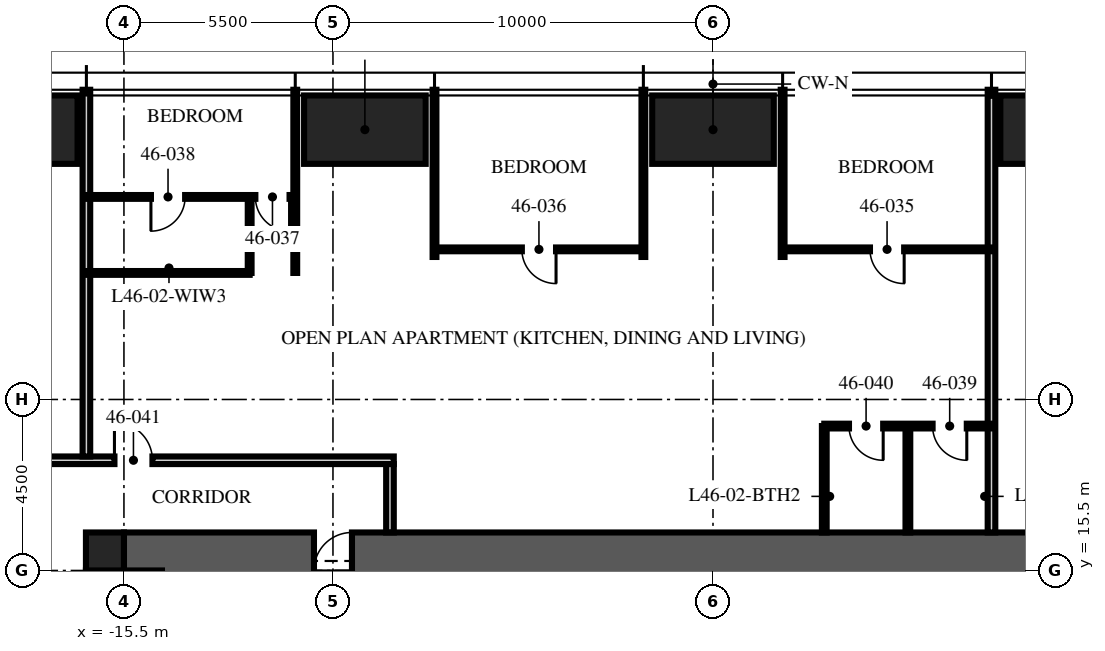
"""IFC4 building model, lengths in metres.
Left out: names, types, materials, properties, quantities, classifications, styles, units other than length and angle.
Written with IfcOpenShell. Run it as: python <this file> out.ifc"""

import sys

from ifc_helpers import new_model, si_unit, direction, frame, frame_2d, origin, origin_2d, place, context, subcontext, project, spatial, rectangle, hollow_rectangle, extrude, element, fill, save


model = new_model("IFC4")
c1 = context("Model", 3, precision=1e-05, world=origin(), true_north=direction((0.0, 1.0)))
c2 = subcontext(c1, "Body", "Model", "MODEL_VIEW")
j1 = project(units=[si_unit("LENGTHUNIT", "METRE"), si_unit("PLANEANGLEUNIT", "RADIAN")], contexts=[c1])
p1 = place(None, origin())
s1 = spatial("IfcSite", under=j1, at=p1, CompositionType="ELEMENT")
p2 = place(p1, origin())
s2 = spatial("IfcBuilding", under=s1, at=p2, CompositionType="ELEMENT")
p3 = place(p2, frame((0.0, 0.0, 182.25)))
s3 = spatial("IfcBuildingStorey", under=s2, at=p3, CompositionType="ELEMENT", Elevation=182.25)
p4 = place(p3, frame((-15.5, 15.5, -0.25), z_axis=(0.0, 0.0, 1.0), x_axis=(1.0, 0.0, 0.0)))
e1 = element("IfcWall", 1, at=p4, inside=s3, PredefinedType="SHEAR", context=c2, shape_type="SweptSolid", body=[
    extrude(rectangle(XDim=31.0, YDim=2.0, at=frame_2d((15.5, 0.0))), origin(), (0.0, 0.0, 1.0), 3.7),
])
p5 = place(p4, frame((5.0, 0.0, 0.25)))
e2 = element("IfcOpeningElement", 2, at=p5, cuts=e1, PredefinedType="OPENING", context=c2, shape_type="SweptSolid", body=[
    extrude(rectangle(XDim=1.0, YDim=2.1, at=frame_2d((0.5, 1.05))), frame((0.0, 1.01, 0.0), z_axis=(0.0, -1.0, 0.0), x_axis=(1.0, 0.0, 0.0)), (0.0, 0.0, 1.0), 2.02),
])
p6 = place(p3, frame((-16.0, 16.0, -0.25), z_axis=(0.0, 0.0, 1.0), x_axis=(1.0, 0.0, 0.0)))
e3 = element("IfcColumn", 3, at=p6, inside=s3, PredefinedType="COLUMN", context=c2, shape_type="SweptSolid", body=[
    extrude(rectangle(XDim=1.0, YDim=1.0, at=origin_2d()), origin(), (0.0, 0.0, 1.0), 3.7),
])
for number, where, z_axis, x_axis in (
    (4, (-18.32, 27.1, 0.0), (0.0, 0.0, 1.0), (1.0, 0.0, 0.0)),
    (5, (-9.16, 27.1, 0.0), (0.0, 0.0, 1.0), (1.0, 0.0, 0.0)),
    (6, (0.0, 27.1, 0.0), (0.0, 0.0, 1.0), (1.0, 0.0, 0.0)),
    (7, (9.16, 27.1, 0.0), (0.0, 0.0, 1.0), (1.0, 0.0, 0.0)),
):
    element("IfcColumn", number, at=place(p3, frame(where, z_axis=z_axis, x_axis=x_axis)), inside=s3, PredefinedType="COLUMN", context=c2, shape_type="SweptSolid", body=[
        extrude(hollow_rectangle(XDim=3.2, YDim=1.8, WallThickness=0.2, at=origin_2d()), origin(), (0.0, 0.0, 1.0), 3.75),
    ])
p7 = place(p3, frame((-18.5, 18.4, 0.0), z_axis=(0.0, 0.0, 1.0), x_axis=(1.0, 0.0, 0.0)))
e8 = element("IfcWall", 8, at=p7, inside=s3, PredefinedType="PARTITIONING", context=c2, shape_type="SweptSolid", body=[
    extrude(rectangle(XDim=10.1, YDim=0.2, at=frame_2d((5.05, 0.0))), origin(), (0.0, 0.0, 1.0), 2.25),
])
p8 = place(p7, frame((2.75, 0.0, 0.0)))
e9 = element("IfcOpeningElement", 9, at=p8, cuts=e8, PredefinedType="OPENING", context=c2, shape_type="SweptSolid", body=[
    extrude(rectangle(XDim=1.0, YDim=2.2, at=frame_2d((0.5, 1.1))), frame((0.0, 0.11, 0.0), z_axis=(0.0, -1.0, 0.0), x_axis=(1.0, 0.0, 0.0)), (0.0, 0.0, 1.0), 0.22),
])
p9 = place(p3, frame((-8.5, 18.3, 0.0), z_axis=(0.0, 0.0, 1.0), x_axis=(0.0, -1.0, 0.0)))
e10 = element("IfcWall", 10, at=p9, inside=s3, PredefinedType="PARTITIONING", context=c2, shape_type="SweptSolid", body=[
    extrude(rectangle(XDim=1.8, YDim=0.2, at=frame_2d((0.9, 0.0))), origin(), (0.0, 0.0, 1.0), 3.45),
])
p10 = place(p3, frame((7.328, 16.5, 0.0), z_axis=(0.0, 0.0, 1.0), x_axis=(0.0, 1.0, 0.0)))
e11 = element("IfcWall", 11, at=p10, inside=s3, PredefinedType="PARTITIONING", context=c2, shape_type="SweptSolid", body=[
    extrude(rectangle(XDim=11.65, YDim=0.2, at=frame_2d((5.825, 0.0))), origin(), (0.0, 0.0, 1.0), 2.56),
])
for number, where, z_axis, x_axis in (
    (12, (1.832, 23.75, 0.0), (0.0, 0.0, 1.0), (0.0, 1.0, 0.0)),
    (13, (-1.832, 23.75, 0.0), (0.0, 0.0, 1.0), (0.0, 1.0, 0.0)),
    (14, (-7.328, 23.75, 0.0), (0.0, 0.0, 1.0), (0.0, 1.0, 0.0)),
):
    element("IfcWall", number, at=place(p3, frame(where, z_axis=z_axis, x_axis=x_axis)), inside=s3, PredefinedType="PARTITIONING", context=c2, shape_type="SweptSolid", body=[
        extrude(rectangle(XDim=4.4, YDim=0.1, at=frame_2d((2.2, 0.0))), origin(), (0.0, 0.0, 1.0), 2.56),
    ])
p11 = place(p3, frame((-10.992, 23.33, 0.0), z_axis=(0.0, 0.0, 1.0), x_axis=(0.0, 1.0, 0.0)))
e15 = element("IfcWall", 15, at=p11, inside=s3, PredefinedType="PARTITIONING", context=c2, shape_type="SweptSolid", body=[
    extrude(rectangle(XDim=4.82, YDim=0.1, at=frame_2d((2.41, 0.0))), origin(), (0.0, 0.0, 1.0), 2.56),
])
p12 = place(p3, frame((-16.488, 18.5, 0.0), z_axis=(0.0, 0.0, 1.0), x_axis=(0.0, 1.0, 0.0)))
e16 = element("IfcWall", 16, at=p12, inside=s3, PredefinedType="PARTITIONING", context=c2, shape_type="SweptSolid", body=[
    extrude(rectangle(XDim=9.65, YDim=0.2, at=frame_2d((4.825, 0.0))), origin(), (0.0, 0.0, 1.0), 2.56),
])
p13 = place(p3, frame((7.328, 23.95, 0.0), z_axis=(0.0, 0.0, 1.0), x_axis=(-1.0, 0.0, 0.0)))
e17 = element("IfcWall", 17, at=p13, inside=s3, PredefinedType="PARTITIONING", context=c2, shape_type="SweptSolid", body=[
    extrude(rectangle(XDim=5.496, YDim=0.1, at=frame_2d((2.748, 0.0))), origin(), (0.0, 0.0, 1.0), 2.56),
])
p14 = place(p13, frame((2.298, 0.0, 0.0)))
e18 = element("IfcOpeningElement", 18, at=p14, cuts=e17, PredefinedType="OPENING", context=c2, shape_type="SweptSolid", body=[
    extrude(rectangle(XDim=0.9, YDim=2.1, at=frame_2d((0.45, 1.05))), frame((0.0, 0.06, 0.0), z_axis=(0.0, -1.0, 0.0), x_axis=(1.0, 0.0, 0.0)), (0.0, 0.0, 1.0), 0.12),
])
p15 = place(p3, frame((-1.832, 23.95, 0.0), z_axis=(0.0, 0.0, 1.0), x_axis=(-1.0, 0.0, 0.0)))
e19 = element("IfcWall", 19, at=p15, inside=s3, PredefinedType="PARTITIONING", context=c2, shape_type="SweptSolid", body=[
    extrude(rectangle(XDim=5.496, YDim=0.1, at=frame_2d((2.748, 0.0))), origin(), (0.0, 0.0, 1.0), 2.56),
])
p16 = place(p15, frame((2.298, 0.0, 0.0)))
e20 = element("IfcOpeningElement", 20, at=p16, cuts=e19, PredefinedType="OPENING", context=c2, shape_type="SweptSolid", body=[
    extrude(rectangle(XDim=0.9, YDim=2.1, at=frame_2d((0.45, 1.05))), frame((0.0, 0.06, 0.0), z_axis=(0.0, -1.0, 0.0), x_axis=(1.0, 0.0, 0.0)), (0.0, 0.0, 1.0), 0.12),
])
p17 = place(p3, frame((-10.992, 25.33, 0.0), z_axis=(0.0, 0.0, 1.0), x_axis=(-1.0, 0.0, 0.0)))
e21 = element("IfcWall", 21, at=p17, inside=s3, PredefinedType="PARTITIONING", context=c2, shape_type="SweptSolid", body=[
    extrude(rectangle(XDim=5.496, YDim=0.1, at=frame_2d((2.748, 0.0))), origin(), (0.0, 0.0, 1.0), 2.56),
])
p18 = place(p17, frame((0.15, 0.0, 0.0)))
e22 = element("IfcOpeningElement", 22, at=p18, cuts=e21, PredefinedType="OPENING", context=c2, shape_type="SweptSolid", body=[
    extrude(rectangle(XDim=0.9, YDim=2.1, at=frame_2d((0.45, 1.05))), frame((0.0, 0.06, 0.0), z_axis=(0.0, -1.0, 0.0), x_axis=(1.0, 0.0, 0.0)), (0.0, 0.0, 1.0), 0.12),
])
p19 = place(p17, frame((2.898, 0.0, 0.0)))
e23 = element("IfcOpeningElement", 23, at=p19, cuts=e21, PredefinedType="OPENING", context=c2, shape_type="SweptSolid", body=[
    extrude(rectangle(XDim=0.9, YDim=2.1, at=frame_2d((0.45, 1.05))), frame((0.0, 0.06, 0.0), z_axis=(0.0, -1.0, 0.0), x_axis=(1.0, 0.0, 0.0)), (0.0, 0.0, 1.0), 0.12),
])
p20 = place(p3, frame((-12.192, 23.33, 0.0), z_axis=(0.0, 0.0, 1.0), x_axis=(0.0, 1.0, 0.0)))
e24 = element("IfcWall", 24, at=p20, inside=s3, PredefinedType="PARTITIONING", context=c2, shape_type="SweptSolid", body=[
    extrude(rectangle(XDim=2.0, YDim=0.1, at=frame_2d((1.0, 0.0))), origin(), (0.0, 0.0, 1.0), 3.45),
])
p21 = place(p3, frame((-12.192, 23.33, 0.0), z_axis=(0.0, 0.0, 1.0), x_axis=(-1.0, 0.0, 0.0)))
e25 = element("IfcWall", 25, at=p21, inside=s3, PredefinedType="PARTITIONING", context=c2, shape_type="SweptSolid", body=[
    extrude(rectangle(XDim=4.296, YDim=0.1, at=frame_2d((2.148, 0.0))), origin(), (0.0, 0.0, 1.0), 2.56),
])
p22 = place(p3, frame((7.328, 19.3, 0.0), z_axis=(0.0, 0.0, 1.0), x_axis=(-1.0, 0.0, 0.0)))
e26 = element("IfcWall", 26, at=p22, inside=s3, PredefinedType="PARTITIONING", context=c2, shape_type="SweptSolid", body=[
    extrude(rectangle(XDim=4.4, YDim=0.125, at=frame_2d((2.2, 0.0))), origin(), (0.0, 0.0, 1.0), 2.56),
])
p23 = place(p22, frame((0.65, 0.0, 0.0)))
e27 = element("IfcOpeningElement", 27, at=p23, cuts=e26, PredefinedType="OPENING", context=c2, shape_type="SweptSolid", body=[
    extrude(rectangle(XDim=0.9, YDim=2.1, at=frame_2d((0.45, 1.05))), frame((0.0, 0.073, 0.0), z_axis=(0.0, -1.0, 0.0), x_axis=(1.0, 0.0, 0.0)), (0.0, 0.0, 1.0), 0.145),
])
p24 = place(p22, frame((2.85, 0.0, 0.0)))
e28 = element("IfcOpeningElement", 28, at=p24, cuts=e26, PredefinedType="OPENING", context=c2, shape_type="SweptSolid", body=[
    extrude(rectangle(XDim=0.9, YDim=2.1, at=frame_2d((0.45, 1.05))), frame((0.0, 0.073, 0.0), z_axis=(0.0, -1.0, 0.0), x_axis=(1.0, 0.0, 0.0)), (0.0, 0.0, 1.0), 0.145),
])
for number, where, z_axis, x_axis in (
    (29, (5.128, 16.5, 0.0), (0.0, 0.0, 1.0), (0.0, 1.0, 0.0)),
    (30, (2.928, 16.5, 0.0), (0.0, 0.0, 1.0), (0.0, 1.0, 0.0)),
):
    element("IfcWall", number, at=place(p3, frame(where, z_axis=z_axis, x_axis=x_axis)), inside=s3, PredefinedType="PARTITIONING", context=c2, shape_type="SweptSolid", body=[
        extrude(rectangle(XDim=2.8, YDim=0.125, at=frame_2d((1.4, 0.0))), origin(), (0.0, 0.0, 1.0), 3.45),
    ])
p25 = place(p5, origin())
e31 = element("IfcDoor", 31, at=p25, inside=s3, OperationType="SINGLE_SWING_RIGHT", PredefinedType="DOOR", context=c2, shape_type="SweptSolid", body=[
    extrude(rectangle(XDim=1.0, YDim=2.1, at=frame_2d((0.5, 1.05))), frame((0.0, 0.025, 0.0), z_axis=(0.0, -1.0, 0.0), x_axis=(1.0, 0.0, 0.0)), (0.0, 0.0, 1.0), 0.05),
])
fill(e2, e31)
p26 = place(p14, origin())
e32 = element("IfcDoor", 32, at=p26, inside=s3, OperationType="SINGLE_SWING_LEFT", PredefinedType="DOOR", context=c2, shape_type="SweptSolid", body=[
    extrude(rectangle(XDim=0.9, YDim=2.1, at=frame_2d((0.45, 1.05))), frame((0.0, 0.025, 0.0), z_axis=(0.0, -1.0, 0.0), x_axis=(1.0, 0.0, 0.0)), (0.0, 0.0, 1.0), 0.05),
])
fill(e18, e32)
p27 = place(p16, origin())
e33 = element("IfcDoor", 33, at=p27, inside=s3, OperationType="SINGLE_SWING_LEFT", PredefinedType="DOOR", context=c2, shape_type="SweptSolid", body=[
    extrude(rectangle(XDim=0.9, YDim=2.1, at=frame_2d((0.45, 1.05))), frame((0.0, 0.025, 0.0), z_axis=(0.0, -1.0, 0.0), x_axis=(1.0, 0.0, 0.0)), (0.0, 0.0, 1.0), 0.05),
])
fill(e20, e33)
p28 = place(p18, origin())
e34 = element("IfcDoor", 34, at=p28, inside=s3, OperationType="SINGLE_SWING_LEFT", PredefinedType="DOOR", context=c2, shape_type="SweptSolid", body=[
    extrude(rectangle(XDim=0.9, YDim=2.1, at=frame_2d((0.45, 1.05))), frame((0.0, 0.025, 0.0), z_axis=(0.0, -1.0, 0.0), x_axis=(1.0, 0.0, 0.0)), (0.0, 0.0, 1.0), 0.05),
])
fill(e22, e34)
p29 = place(p19, origin())
e35 = element("IfcDoor", 35, at=p29, inside=s3, OperationType="SINGLE_SWING_RIGHT", PredefinedType="DOOR", context=c2, shape_type="SweptSolid", body=[
    extrude(rectangle(XDim=0.9, YDim=2.1, at=frame_2d((0.45, 1.05))), frame((0.0, 0.025, 0.0), z_axis=(0.0, -1.0, 0.0), x_axis=(1.0, 0.0, 0.0)), (0.0, 0.0, 1.0), 0.05),
])
fill(e23, e35)
p30 = place(p23, origin())
e36 = element("IfcDoor", 36, at=p30, inside=s3, OperationType="SINGLE_SWING_LEFT", PredefinedType="DOOR", context=c2, shape_type="SweptSolid", body=[
    extrude(rectangle(XDim=0.9, YDim=2.1, at=frame_2d((0.45, 1.05))), frame((0.0, 0.025, 0.0), z_axis=(0.0, -1.0, 0.0), x_axis=(1.0, 0.0, 0.0)), (0.0, 0.0, 1.0), 0.05),
])
fill(e27, e36)
p31 = place(p24, origin())
e37 = element("IfcDoor", 37, at=p31, inside=s3, OperationType="SINGLE_SWING_LEFT", PredefinedType="DOOR", context=c2, shape_type="SweptSolid", body=[
    extrude(rectangle(XDim=0.9, YDim=2.1, at=frame_2d((0.45, 1.05))), frame((0.0, 0.025, 0.0), z_axis=(0.0, -1.0, 0.0), x_axis=(1.0, 0.0, 0.0)), (0.0, 0.0, 1.0), 0.05),
])
fill(e28, e37)
p32 = place(p8, origin())
e38 = element("IfcDoor", 38, at=p32, inside=s3, OperationType="SINGLE_SWING_LEFT", PredefinedType="DOOR", context=c2, shape_type="SweptSolid", body=[
    extrude(rectangle(XDim=1.0, YDim=2.2, at=frame_2d((0.5, 1.1))), frame((0.0, 0.025, 0.0), z_axis=(0.0, -1.0, 0.0), x_axis=(1.0, 0.0, 0.0)), (0.0, 0.0, 1.0), 0.05),
])
fill(e9, e38)
save(model, sys.argv[1])
